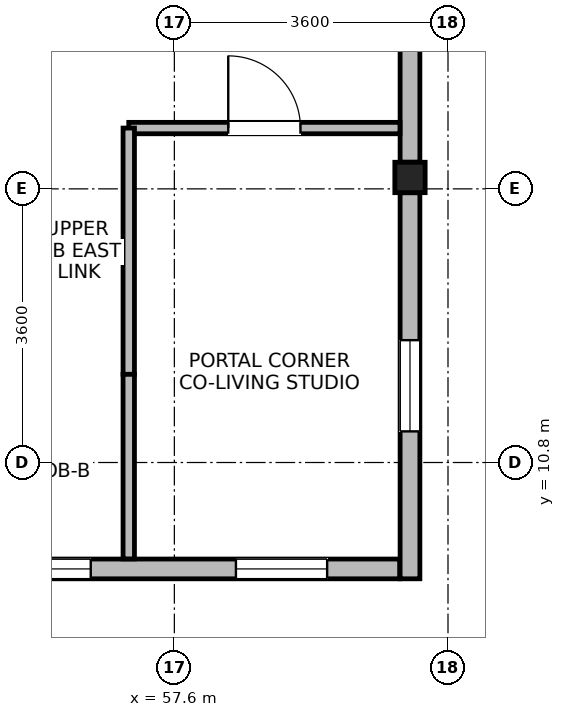
"""IFC4 building model, lengths in metres.
Left out: names, types, materials, properties, quantities, classifications, styles, units other than length and angle.
Written with IfcOpenShell. Run it as: python <this file> out.ifc"""

import sys

from ifc_helpers import new_model, si_unit, direction, frame, frame_2d, origin, origin_2d, place, context, subcontext, project, spatial, rectangle, i_section, extrude, source, transform, mapped, element, fill, save


model = new_model("IFC4")
c1 = context("Model", 3, precision=1e-05, world=origin(), true_north=direction((0.0, 1.0)))
c2 = subcontext(c1, "Body", "Model", "MODEL_VIEW")
j1 = project(units=[si_unit("LENGTHUNIT", "METRE"), si_unit("PLANEANGLEUNIT", "RADIAN")], contexts=[c1])
p1 = place(None, origin())
s1 = spatial("IfcSite", under=j1, at=p1, CompositionType="ELEMENT")
p2 = place(p1, origin())
s2 = spatial("IfcBuilding", under=s1, at=p2, CompositionType="ELEMENT")
p3 = place(p2, frame((0.0, 0.0, 242.5)))
s3 = spatial("IfcBuildingStorey", under=s2, at=p3, CompositionType="ELEMENT", Elevation=242.5)
m1 = source(origin(), c2, "Body", "SweptSolid", [
    extrude(i_section(OverallWidth=0.399, OverallDepth=0.4, WebThickness=0.017, FlangeThickness=0.023, FilletRadius=0.015, at=origin_2d()), origin(), (0.0, 0.0, 1.0), 3.7),
])
p4 = place(p3, frame((60.7, 14.55, 0.0), z_axis=(0.0, 0.0, 1.0), x_axis=(1.0, 0.0, 0.0)))
e1 = element("IfcColumn", 1, at=p4, inside=s3, PredefinedType="COLUMN", context=c2, shape_type="MappedRepresentation", body=[
    mapped(m1, transform((0.0, 0.0, 0.0), x_axis=(1.0, 0.0, 0.0), y_axis=(0.0, 1.0, 0.0), z_axis=(0.0, 0.0, 1.0), scale=1.0)),
])
p5 = place(p3, frame((60.565, 9.4, 0.0), z_axis=(0.0, 0.0, 1.0), x_axis=(-1.0, 0.0, 0.0)))
e2 = element("IfcWall", 2, at=p5, inside=s3, PredefinedType="STANDARD", context=c2, shape_type="SweptSolid", body=[
    extrude(rectangle(XDim=9.33, YDim=0.26, at=frame_2d((4.665, 0.0))), origin(), (0.0, 0.0, 1.0), 3.42),
])
p6 = place(p5, frame((0.955, 0.0, 0.85)))
e3 = element("IfcOpeningElement", 3, at=p6, cuts=e2, PredefinedType="OPENING", context=c2, shape_type="SweptSolid", body=[
    extrude(rectangle(XDim=1.2, YDim=1.75, at=frame_2d((0.6, 0.875))), frame((0.0, 0.14, 0.0), z_axis=(0.0, -1.0, 0.0), x_axis=(1.0, 0.0, 0.0)), (0.0, 0.0, 1.0), 0.28),
])
p7 = place(p5, frame((4.065, 0.0, 0.85)))
e4 = element("IfcOpeningElement", 4, at=p7, cuts=e2, PredefinedType="OPENING", context=c2, shape_type="SweptSolid", body=[
    extrude(rectangle(XDim=1.2, YDim=1.75, at=frame_2d((0.6, 0.875))), frame((0.0, 0.14, 0.0), z_axis=(0.0, -1.0, 0.0), x_axis=(1.0, 0.0, 0.0)), (0.0, 0.0, 1.0), 0.28),
])
p8 = place(p5, frame((7.175, 0.0, 0.85)))
e5 = element("IfcOpeningElement", 5, at=p8, cuts=e2, PredefinedType="OPENING", context=c2, shape_type="SweptSolid", body=[
    extrude(rectangle(XDim=1.2, YDim=1.75, at=frame_2d((0.6, 0.875))), frame((0.0, 0.14, 0.0), z_axis=(0.0, -1.0, 0.0), x_axis=(1.0, 0.0, 0.0)), (0.0, 0.0, 1.0), 0.28),
])
p9 = place(p3, frame((60.7, 14.349, 0.0), z_axis=(0.0, 0.0, 1.0), x_axis=(0.0, -1.0, 0.0)))
e6 = element("IfcWall", 6, at=p9, inside=s3, PredefinedType="STANDARD", context=c2, shape_type="SweptSolid", body=[
    extrude(rectangle(XDim=5.079, YDim=0.26, at=frame_2d((2.54, 0.0))), origin(), (0.0, 0.0, 1.0), 3.02),
])
p10 = place(p9, frame((1.939, 0.0, 0.85)))
e7 = element("IfcOpeningElement", 7, at=p10, cuts=e6, PredefinedType="OPENING", context=c2, shape_type="SweptSolid", body=[
    extrude(rectangle(XDim=1.2, YDim=1.75, at=frame_2d((0.6, 0.875))), frame((0.0, 0.14, 0.0), z_axis=(0.0, -1.0, 0.0), x_axis=(1.0, 0.0, 0.0)), (0.0, 0.0, 1.0), 0.28),
])
p11 = place(p3, frame((60.7, 21.399, 0.0), z_axis=(0.0, 0.0, 1.0), x_axis=(0.0, -1.0, 0.0)))
e8 = element("IfcWall", 8, at=p11, inside=s3, PredefinedType="STANDARD", context=c2, shape_type="SweptSolid", body=[
    extrude(rectangle(XDim=6.648, YDim=0.26, at=frame_2d((3.324, 0.0))), origin(), (0.0, 0.0, 1.0), 3.02),
])
p12 = place(p11, frame((1.062, 0.0, 0.85)))
e9 = element("IfcOpeningElement", 9, at=p12, cuts=e8, PredefinedType="OPENING", context=c2, shape_type="SweptSolid", body=[
    extrude(rectangle(XDim=1.2, YDim=1.75, at=frame_2d((0.6, 0.875))), frame((0.0, 0.14, 0.0), z_axis=(0.0, -1.0, 0.0), x_axis=(1.0, 0.0, 0.0)), (0.0, 0.0, 1.0), 0.28),
])
p13 = place(p11, frame((2.849, 0.0, 0.85)))
e10 = element("IfcOpeningElement", 10, at=p13, cuts=e8, PredefinedType="OPENING", context=c2, shape_type="SweptSolid", body=[
    extrude(rectangle(XDim=0.95, YDim=1.75, at=frame_2d((0.475, 0.875))), frame((0.0, 0.14, 0.0), z_axis=(0.0, -1.0, 0.0), x_axis=(1.0, 0.0, 0.0)), (0.0, 0.0, 1.0), 0.28),
])
p14 = place(p3, frame((57.0, 15.2, 0.0), z_axis=(0.0, 0.0, 1.0), x_axis=(1.0, 0.0, 0.0)))
e11 = element("IfcWall", 11, at=p14, inside=s3, PredefinedType="PARTITIONING", context=c2, shape_type="SweptSolid", body=[
    extrude(rectangle(XDim=3.568, YDim=0.15, at=frame_2d((1.784, 0.0))), origin(), (0.0, 0.0, 1.0), 3.42),
])
p15 = place(p14, frame((1.309, 0.0, 0.0)))
e12 = element("IfcOpeningElement", 12, at=p15, cuts=e11, PredefinedType="OPENING", context=c2, shape_type="SweptSolid", body=[
    extrude(rectangle(XDim=0.95, YDim=2.1, at=frame_2d((0.475, 1.05))), frame((0.0, 0.085, 0.0), z_axis=(0.0, -1.0, 0.0), x_axis=(1.0, 0.0, 0.0)), (0.0, 0.0, 1.0), 0.17),
])
p16 = place(p3, frame((57.0, 11.96, 0.0), z_axis=(0.0, 0.0, 1.0), x_axis=(0.0, 1.0, 0.0)))
e13 = element("IfcWall", 13, at=p16, inside=s3, PredefinedType="PARTITIONING", context=c2, shape_type="SweptSolid", body=[
    extrude(rectangle(XDim=3.24, YDim=0.15, at=frame_2d((1.62, 0.0))), origin(), (0.0, 0.0, 1.0), 3.42),
])
p17 = place(p3, frame((57.0, 9.532, 0.0), z_axis=(0.0, 0.0, 1.0), x_axis=(0.0, 1.0, 0.0)))
e14 = element("IfcWall", 14, at=p17, inside=s3, PredefinedType="PARTITIONING", context=c2, shape_type="SweptSolid", body=[
    extrude(rectangle(XDim=2.428, YDim=0.15, at=frame_2d((1.214, 0.0))), origin(), (0.0, 0.0, 1.0), 3.42),
])
p18 = place(p6, origin())
e15 = element("IfcWindow", 15, at=p18, inside=s3, PartitioningType="SINGLE_PANEL", PredefinedType="WINDOW", context=c2, shape_type="SweptSolid", body=[
    extrude(rectangle(XDim=1.2, YDim=1.75, at=frame_2d((0.6, 0.875))), frame((0.0, 0.03, 0.0), z_axis=(0.0, -1.0, 0.0), x_axis=(1.0, 0.0, 0.0)), (0.0, 0.0, 1.0), 0.06),
])
fill(e3, e15)
p19 = place(p7, origin())
e16 = element("IfcWindow", 16, at=p19, inside=s3, PartitioningType="SINGLE_PANEL", PredefinedType="WINDOW", context=c2, shape_type="SweptSolid", body=[
    extrude(rectangle(XDim=1.2, YDim=1.75, at=frame_2d((0.6, 0.875))), frame((0.0, 0.03, 0.0), z_axis=(0.0, -1.0, 0.0), x_axis=(1.0, 0.0, 0.0)), (0.0, 0.0, 1.0), 0.06),
])
fill(e4, e16)
p20 = place(p10, origin())
e17 = element("IfcWindow", 17, at=p20, inside=s3, PartitioningType="SINGLE_PANEL", PredefinedType="WINDOW", context=c2, shape_type="SweptSolid", body=[
    extrude(rectangle(XDim=1.2, YDim=1.75, at=frame_2d((0.6, 0.875))), frame((0.0, 0.03, 0.0), z_axis=(0.0, -1.0, 0.0), x_axis=(1.0, 0.0, 0.0)), (0.0, 0.0, 1.0), 0.06),
])
fill(e7, e17)
p21 = place(p15, origin())
e18 = element("IfcDoor", 18, at=p21, inside=s3, OperationType="SINGLE_SWING_LEFT", PredefinedType="DOOR", context=c2, shape_type="SweptSolid", body=[
    extrude(rectangle(XDim=0.95, YDim=2.1, at=frame_2d((0.475, 1.05))), frame((0.0, 0.025, 0.0), z_axis=(0.0, -1.0, 0.0), x_axis=(1.0, 0.0, 0.0)), (0.0, 0.0, 1.0), 0.05),
])
fill(e12, e18)
save(model, sys.argv[1])
